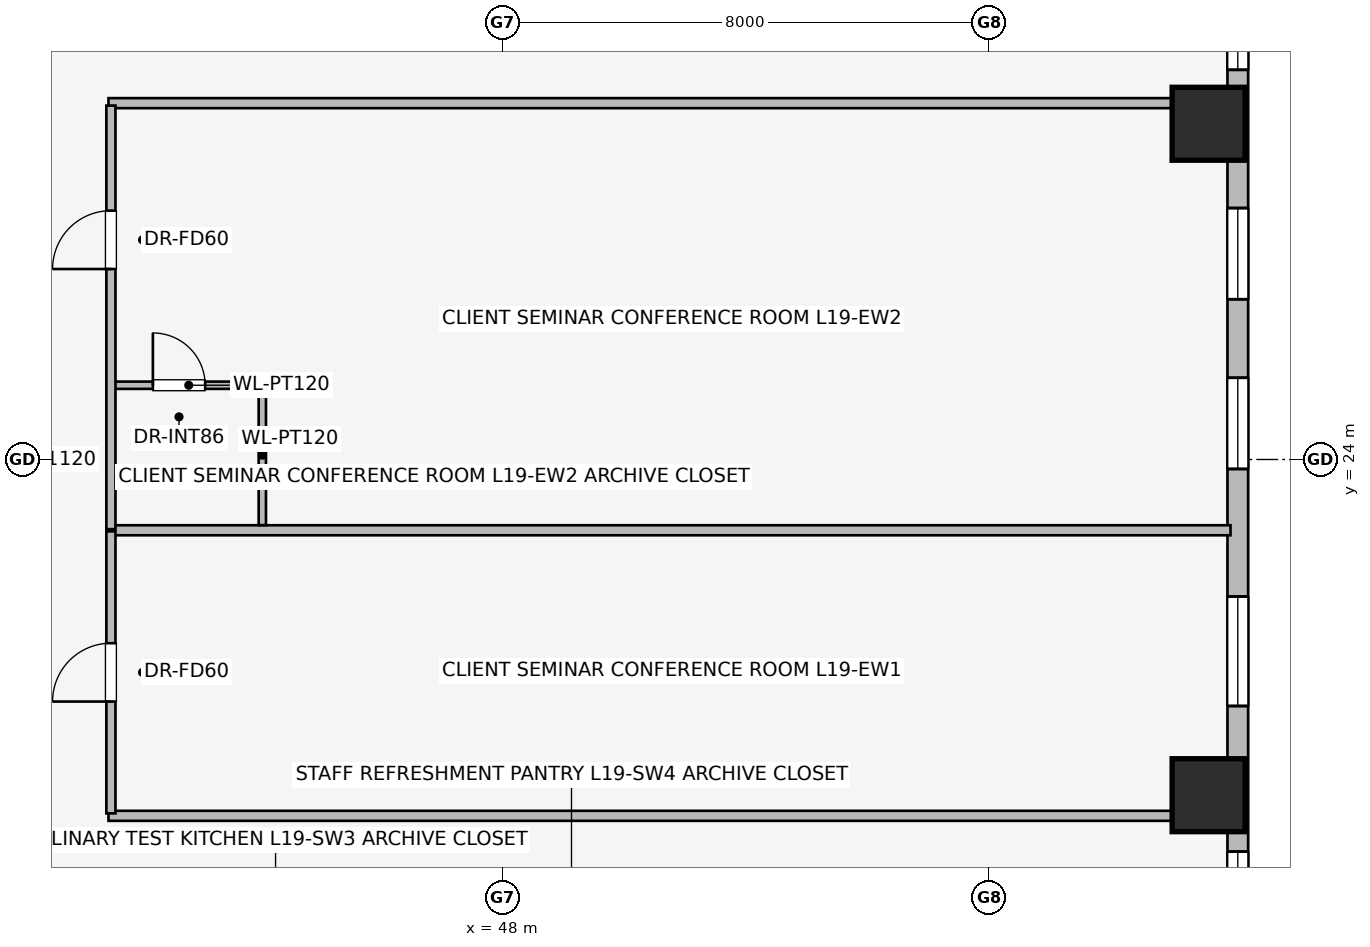
"""IFC4 building model, lengths in metres.
Left out: names, types, materials, properties, quantities, classifications, styles, units other than length and angle.
Written with IfcOpenShell. Run it as: python <this file> out.ifc"""

import sys

from ifc_helpers import new_model, si_unit, direction, frame, frame_2d, origin, origin_2d, place, context, subcontext, project, spatial, rectangle, extrude, element, fill, save


model = new_model("IFC4")
c1 = context("Model", 3, precision=1e-05, world=origin(), true_north=direction((0.0, 1.0)))
c2 = subcontext(c1, "Body", "Model", "MODEL_VIEW")
j1 = project(units=[si_unit("LENGTHUNIT", "METRE"), si_unit("PLANEANGLEUNIT", "RADIAN")], contexts=[c1])
p1 = place(None, origin())
s1 = spatial("IfcSite", under=j1, at=p1, CompositionType="ELEMENT")
p2 = place(p1, origin())
s2 = spatial("IfcBuilding", under=s1, at=p2, CompositionType="ELEMENT")
p3 = place(p2, frame((0.0, 0.0, 74.45)))
s3 = spatial("IfcBuildingStorey", under=s2, at=p3, CompositionType="ELEMENT", Elevation=74.45)
for number, where, z_axis, x_axis in (
    (1, (59.613, 18.479, 0.0), (0.0, 0.0, 1.0), (1.0, 0.0, 0.0)),
    (2, (59.613, 29.521, 0.0), (0.0, 0.0, 1.0), (1.0, 0.0, 0.0)),
):
    element("IfcColumn", number, at=place(p3, frame(where, z_axis=z_axis, x_axis=x_axis)), inside=s3, PredefinedType="COLUMN", context=c2, shape_type="SweptSolid", body=[
        extrude(rectangle(XDim=1.2, YDim=1.2, at=origin_2d()), origin(), (0.0, 0.0, 1.0), 3.65),
    ])
p4 = place(p3, frame((60.093, 33.202, 0.0), z_axis=(0.0, 0.0, 1.0), x_axis=(0.0, -1.0, 0.0)))
e3 = element("IfcWall", 3, at=p4, inside=s3, PredefinedType="STANDARD", context=c2, shape_type="SweptSolid", body=[
    extrude(rectangle(XDim=18.404, YDim=0.34, at=frame_2d((9.202, 0.0))), origin(), (0.0, 0.0, 1.0), 2.684),
])
p5 = place(p4, frame((1.744, 0.0, 0.75)))
e4 = element("IfcOpeningElement", 4, at=p5, cuts=e3, PredefinedType="OPENING", context=c2, shape_type="SweptSolid", body=[
    extrude(rectangle(XDim=1.05, YDim=1.4, at=frame_2d((0.525, 0.7))), frame((0.0, 0.18, 0.0), z_axis=(0.0, -1.0, 0.0), x_axis=(1.0, 0.0, 0.0)), (0.0, 0.0, 1.0), 0.36),
])
p6 = place(p4, frame((5.067, 0.0, 0.75)))
e5 = element("IfcOpeningElement", 5, at=p6, cuts=e3, PredefinedType="OPENING", context=c2, shape_type="SweptSolid", body=[
    extrude(rectangle(XDim=1.5, YDim=1.5, at=frame_2d((0.75, 0.75))), frame((0.0, 0.18, 0.0), z_axis=(0.0, -1.0, 0.0), x_axis=(1.0, 0.0, 0.0)), (0.0, 0.0, 1.0), 0.36),
])
p7 = place(p4, frame((7.858, 0.0, 0.75)))
e6 = element("IfcOpeningElement", 6, at=p7, cuts=e3, PredefinedType="OPENING", context=c2, shape_type="SweptSolid", body=[
    extrude(rectangle(XDim=1.5, YDim=1.5, at=frame_2d((0.75, 0.75))), frame((0.0, 0.18, 0.0), z_axis=(0.0, -1.0, 0.0), x_axis=(1.0, 0.0, 0.0)), (0.0, 0.0, 1.0), 0.36),
])
p8 = place(p4, frame((11.456, 0.0, 0.75)))
e7 = element("IfcOpeningElement", 7, at=p8, cuts=e3, PredefinedType="OPENING", context=c2, shape_type="SweptSolid", body=[
    extrude(rectangle(XDim=1.8, YDim=1.5, at=frame_2d((0.9, 0.75))), frame((0.0, 0.18, 0.0), z_axis=(0.0, -1.0, 0.0), x_axis=(1.0, 0.0, 0.0)), (0.0, 0.0, 1.0), 0.36),
])
p9 = place(p4, frame((15.65, 0.0, 0.75)))
e8 = element("IfcOpeningElement", 8, at=p9, cuts=e3, PredefinedType="OPENING", context=c2, shape_type="SweptSolid", body=[
    extrude(rectangle(XDim=1.05, YDim=1.4, at=frame_2d((0.525, 0.7))), frame((0.0, 0.18, 0.0), z_axis=(0.0, -1.0, 0.0), x_axis=(1.0, 0.0, 0.0)), (0.0, 0.0, 1.0), 0.36),
])
for number, where, z_axis, x_axis in (
    (9, (41.52, 18.14, 0.0), (0.0, 0.0, 1.0), (1.0, 0.0, 0.0)),
    (10, (41.52, 29.86, 0.0), (0.0, 0.0, 1.0), (1.0, 0.0, 0.0)),
):
    element("IfcWall", number, at=place(p3, frame(where, z_axis=z_axis, x_axis=x_axis)), inside=s3, PredefinedType="PARTITIONING", context=c2, shape_type="SweptSolid", body=[
        extrude(rectangle(XDim=18.453, YDim=0.165, at=frame_2d((9.227, 0.0))), origin(), (0.0, 0.0, 1.0), 3.39),
    ])
p10 = place(p3, frame((41.59, 22.836, 0.0), z_axis=(0.0, 0.0, 1.0), x_axis=(1.0, 0.0, 0.0)))
e11 = element("IfcWall", 11, at=p10, inside=s3, PredefinedType="PARTITIONING", context=c2, shape_type="SweptSolid", body=[
    extrude(rectangle(XDim=18.383, YDim=0.165, at=frame_2d((9.191, 0.0))), origin(), (0.0, 0.0, 1.0), 3.39),
])
p11 = place(p3, frame((41.56, 18.18, 0.0), z_axis=(0.0, 0.0, 1.0), x_axis=(0.0, 1.0, 0.0)))
e12 = element("IfcWall", 12, at=p11, inside=s3, PredefinedType="PARTITIONING", context=c2, shape_type="SweptSolid", body=[
    extrude(rectangle(XDim=4.638, YDim=0.15, at=frame_2d((2.319, 0.0))), origin(), (0.0, 0.0, 1.0), 3.39),
])
p12 = place(p11, frame((1.839, 0.0, 0.0)))
e13 = element("IfcOpeningElement", 13, at=p12, cuts=e12, PredefinedType="OPENING", context=c2, shape_type="SweptSolid", body=[
    extrude(rectangle(XDim=0.96, YDim=2.0, at=frame_2d((0.48, 1.0))), frame((0.0, 0.085, 0.0), z_axis=(0.0, -1.0, 0.0), x_axis=(1.0, 0.0, 0.0)), (0.0, 0.0, 1.0), 0.17),
])
p13 = place(p3, frame((41.6, 25.221, 0.0), z_axis=(0.0, 0.0, 1.0), x_axis=(1.0, 0.0, 0.0)))
e14 = element("IfcWall", 14, at=p13, inside=s3, PredefinedType="PARTITIONING", context=c2, shape_type="SweptSolid", body=[
    extrude(rectangle(XDim=2.48, YDim=0.12, at=frame_2d((1.24, 0.0))), origin(), (0.0, 0.0, 1.0), 3.39),
])
p14 = place(p13, frame((0.65, 0.0, 0.0)))
e15 = element("IfcOpeningElement", 15, at=p14, cuts=e14, PredefinedType="OPENING", context=c2, shape_type="SweptSolid", body=[
    extrude(rectangle(XDim=0.86, YDim=2.0, at=frame_2d((0.43, 1.0))), frame((0.0, 0.07, 0.0), z_axis=(0.0, -1.0, 0.0), x_axis=(1.0, 0.0, 0.0)), (0.0, 0.0, 1.0), 0.14),
])
p15 = place(p3, frame((44.05, 22.921, 0.0), z_axis=(0.0, 0.0, 1.0), x_axis=(0.0, 1.0, 0.0)))
e16 = element("IfcWall", 16, at=p15, inside=s3, PredefinedType="PARTITIONING", context=c2, shape_type="SweptSolid", body=[
    extrude(rectangle(XDim=2.3, YDim=0.12, at=frame_2d((1.15, 0.0))), origin(), (0.0, 0.0, 1.0), 3.39),
])
p16 = place(p3, frame((41.56, 22.854, 0.0), z_axis=(0.0, 0.0, 1.0), x_axis=(0.0, 1.0, 0.0)))
e17 = element("IfcWall", 17, at=p16, inside=s3, PredefinedType="PARTITIONING", context=c2, shape_type="SweptSolid", body=[
    extrude(rectangle(XDim=6.966, YDim=0.15, at=frame_2d((3.483, 0.0))), origin(), (0.0, 0.0, 1.0), 3.39),
])
p17 = place(p16, frame((4.278, 0.0, 0.0)))
e18 = element("IfcOpeningElement", 18, at=p17, cuts=e17, PredefinedType="OPENING", context=c2, shape_type="SweptSolid", body=[
    extrude(rectangle(XDim=0.96, YDim=2.0, at=frame_2d((0.48, 1.0))), frame((0.0, 0.085, 0.0), z_axis=(0.0, -1.0, 0.0), x_axis=(1.0, 0.0, 0.0)), (0.0, 0.0, 1.0), 0.17),
])
p18 = place(p5, origin())
e19 = element("IfcWindow", 19, at=p18, inside=s3, PartitioningType="SINGLE_PANEL", PredefinedType="WINDOW", context=c2, shape_type="SweptSolid", body=[
    extrude(rectangle(XDim=1.05, YDim=1.4, at=frame_2d((0.525, 0.7))), frame((0.0, 0.03, 0.0), z_axis=(0.0, -1.0, 0.0), x_axis=(1.0, 0.0, 0.0)), (0.0, 0.0, 1.0), 0.06),
])
fill(e4, e19)
p19 = place(p6, origin())
e20 = element("IfcWindow", 20, at=p19, inside=s3, PartitioningType="SINGLE_PANEL", PredefinedType="WINDOW", context=c2, shape_type="SweptSolid", body=[
    extrude(rectangle(XDim=1.5, YDim=1.5, at=frame_2d((0.75, 0.75))), frame((0.0, 0.03, 0.0), z_axis=(0.0, -1.0, 0.0), x_axis=(1.0, 0.0, 0.0)), (0.0, 0.0, 1.0), 0.06),
])
fill(e5, e20)
p20 = place(p7, origin())
e21 = element("IfcWindow", 21, at=p20, inside=s3, PartitioningType="SINGLE_PANEL", PredefinedType="WINDOW", context=c2, shape_type="SweptSolid", body=[
    extrude(rectangle(XDim=1.5, YDim=1.5, at=frame_2d((0.75, 0.75))), frame((0.0, 0.03, 0.0), z_axis=(0.0, -1.0, 0.0), x_axis=(1.0, 0.0, 0.0)), (0.0, 0.0, 1.0), 0.06),
])
fill(e6, e21)
p21 = place(p8, origin())
e22 = element("IfcWindow", 22, at=p21, inside=s3, PartitioningType="SINGLE_PANEL", PredefinedType="WINDOW", context=c2, shape_type="SweptSolid", body=[
    extrude(rectangle(XDim=1.8, YDim=1.5, at=frame_2d((0.9, 0.75))), frame((0.0, 0.03, 0.0), z_axis=(0.0, -1.0, 0.0), x_axis=(1.0, 0.0, 0.0)), (0.0, 0.0, 1.0), 0.06),
])
fill(e7, e22)
p22 = place(p9, origin())
e23 = element("IfcWindow", 23, at=p22, inside=s3, PartitioningType="SINGLE_PANEL", PredefinedType="WINDOW", context=c2, shape_type="SweptSolid", body=[
    extrude(rectangle(XDim=1.05, YDim=1.4, at=frame_2d((0.525, 0.7))), frame((0.0, 0.03, 0.0), z_axis=(0.0, -1.0, 0.0), x_axis=(1.0, 0.0, 0.0)), (0.0, 0.0, 1.0), 0.06),
])
fill(e8, e23)
p23 = place(p12, origin())
e24 = element("IfcDoor", 24, at=p23, inside=s3, OperationType="SINGLE_SWING_LEFT", PredefinedType="DOOR", context=c2, shape_type="SweptSolid", body=[
    extrude(rectangle(XDim=0.96, YDim=2.0, at=frame_2d((0.48, 1.0))), frame((0.0, 0.025, 0.0), z_axis=(0.0, -1.0, 0.0), x_axis=(1.0, 0.0, 0.0)), (0.0, 0.0, 1.0), 0.05),
])
fill(e13, e24)
p24 = place(p14, origin())
e25 = element("IfcDoor", 25, at=p24, inside=s3, OperationType="SINGLE_SWING_LEFT", PredefinedType="DOOR", context=c2, shape_type="SweptSolid", body=[
    extrude(rectangle(XDim=0.86, YDim=2.0, at=frame_2d((0.43, 1.0))), frame((0.0, 0.025, 0.0), z_axis=(0.0, -1.0, 0.0), x_axis=(1.0, 0.0, 0.0)), (0.0, 0.0, 1.0), 0.05),
])
fill(e15, e25)
p25 = place(p17, origin())
e26 = element("IfcDoor", 26, at=p25, inside=s3, OperationType="SINGLE_SWING_LEFT", PredefinedType="DOOR", context=c2, shape_type="SweptSolid", body=[
    extrude(rectangle(XDim=0.96, YDim=2.0, at=frame_2d((0.48, 1.0))), frame((0.0, 0.025, 0.0), z_axis=(0.0, -1.0, 0.0), x_axis=(1.0, 0.0, 0.0)), (0.0, 0.0, 1.0), 0.05),
])
fill(e18, e26)
save(model, sys.argv[1])
